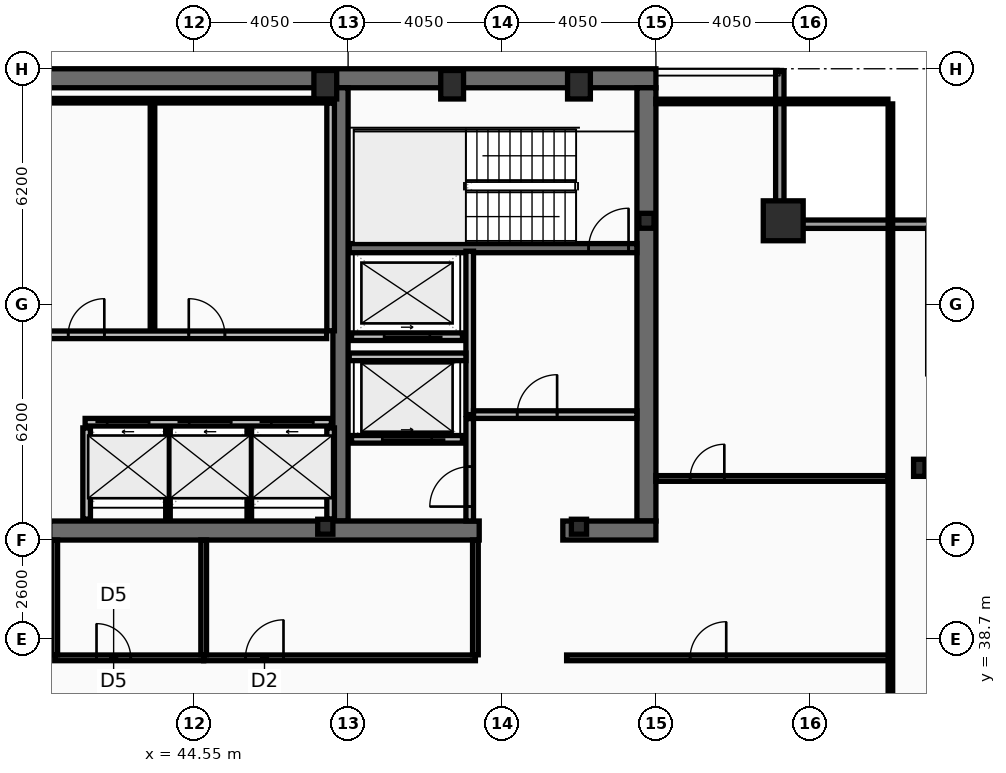
"""IFC4 building model, lengths in metres.
Left out: names, types, materials, properties, quantities, classifications, styles, units other than length and angle.
Written with IfcOpenShell. Run it as: python <this file> out.ifc"""

import sys

from ifc_helpers import new_model, si_unit, direction, frame, frame_2d, origin, origin_2d, place, context, subcontext, project, spatial, rectangle, hollow_rectangle, i_section, extrude, element, fill, save


model = new_model("IFC4")
c1 = context("Model", 3, precision=1e-05, world=origin(), true_north=direction((0.0, 1.0)))
c2 = subcontext(c1, "Body", "Model", "MODEL_VIEW")
j1 = project(units=[si_unit("LENGTHUNIT", "METRE"), si_unit("PLANEANGLEUNIT", "RADIAN")], contexts=[c1])
p1 = place(None, origin())
s1 = spatial("IfcSite", under=j1, at=p1, CompositionType="ELEMENT")
p2 = place(p1, origin())
s2 = spatial("IfcBuilding", under=s1, at=p2, CompositionType="ELEMENT")
p3 = place(p2, frame((0.0, 0.0, 273.4)))
s3 = spatial("IfcBuildingStorey", under=s2, at=p3, CompositionType="ELEMENT", Elevation=273.4)
p4 = place(p3, frame((16.2, 53.45, 0.0), z_axis=(0.0, 0.0, 1.0), x_axis=(1.0, 0.0, 0.0)))
e1 = element("IfcWall", 1, at=p4, inside=s3, PredefinedType="SHEAR", context=c2, shape_type="SweptSolid", body=[
    extrude(rectangle(XDim=40.5, YDim=0.5, at=frame_2d((20.25, 0.0))), origin(), (0.0, 0.0, 1.0), 3.44),
])
p5 = place(p3, frame((56.45, 53.2, 0.0), z_axis=(0.0, 0.0, 1.0), x_axis=(0.0, -1.0, 0.0)))
e2 = element("IfcWall", 2, at=p5, inside=s3, PredefinedType="SHEAR", context=c2, shape_type="SweptSolid", body=[
    extrude(rectangle(XDim=11.4, YDim=0.5, at=frame_2d((5.7, 0.0))), origin(), (0.0, 0.0, 1.0), 3.44),
])
p6 = place(p3, frame((48.4, 41.8, 0.0), z_axis=(0.0, 0.0, 1.0), x_axis=(0.0, 1.0, 0.0)))
e3 = element("IfcWall", 3, at=p6, inside=s3, PredefinedType="SHEAR", context=c2, shape_type="SweptSolid", body=[
    extrude(rectangle(XDim=11.4, YDim=0.4, at=frame_2d((5.7, 0.0))), origin(), (0.0, 0.0, 1.0), 3.44),
])
p7 = place(p3, frame((52.05, 41.55, 0.0), z_axis=(0.0, 0.0, 1.0), x_axis=(-1.0, 0.0, 0.0)))
e4 = element("IfcWall", 4, at=p7, inside=s3, PredefinedType="SHEAR", context=c2, shape_type="SweptSolid", body=[
    extrude(rectangle(XDim=11.3, YDim=0.5, at=frame_2d((5.65, 0.0))), origin(), (0.0, 0.0, 1.0), 3.44),
])
p8 = place(p3, frame((56.7, 41.55, 0.0), z_axis=(0.0, 0.0, 1.0), x_axis=(-1.0, 0.0, 0.0)))
e5 = element("IfcWall", 5, at=p8, inside=s3, PredefinedType="SHEAR", context=c2, shape_type="SweptSolid", body=[
    extrude(rectangle(XDim=2.45, YDim=0.5, at=frame_2d((1.225, 0.0))), origin(), (0.0, 0.0, 1.0), 3.44),
])
p9 = place(p3, frame((48.63, 48.98, 0.0), z_axis=(0.0, 0.0, 1.0), x_axis=(1.0, 0.0, 0.0)))
e6 = element("IfcWall", 6, at=p9, inside=s3, PredefinedType="SHEAR", context=c2, shape_type="SweptSolid", body=[
    extrude(rectangle(XDim=7.57, YDim=0.24, at=frame_2d((3.785, 0.0))), origin(), (0.0, 0.0, 1.0), 3.44),
])
p10 = place(p9, frame((6.3, 0.0, 0.0)))
e7 = element("IfcOpeningElement", 7, at=p10, cuts=e6, PredefinedType="OPENING", context=c2, shape_type="SweptSolid", body=[
    extrude(rectangle(XDim=1.05, YDim=2.15, at=frame_2d((0.525, 1.075))), frame((0.0, 0.13, 0.0), z_axis=(0.0, -1.0, 0.0), x_axis=(1.0, 0.0, 0.0)), (0.0, 0.0, 1.0), 0.26),
])
p11 = place(p3, frame((60.05, 49.7, 0.0), z_axis=(0.0, 0.0, 1.0), x_axis=(1.0, 0.0, 0.0)))
e8 = element("IfcColumn", 8, at=p11, inside=s3, PredefinedType="COLUMN", context=c2, shape_type="SweptSolid", body=[
    extrude(hollow_rectangle(XDim=1.05, YDim=1.05, WallThickness=0.055, at=origin_2d()), origin(), (0.0, 0.0, 1.0), 3.6),
])
for number, where, z_axis, x_axis in (
    (9, (48.0, 53.28, 0.0), (0.0, 0.0, 1.0), (1.0, 0.0, 0.0)),
    (10, (51.337, 53.28, 0.0), (0.0, 0.0, 1.0), (1.0, 0.0, 0.0)),
    (11, (54.675, 53.28, 0.0), (0.0, 0.0, 1.0), (1.0, 0.0, 0.0)),
):
    element("IfcColumn", number, at=place(p3, frame(where, z_axis=z_axis, x_axis=x_axis)), inside=s3, PredefinedType="COLUMN", context=c2, shape_type="SweptSolid", body=[
        extrude(hollow_rectangle(XDim=0.6, YDim=0.75, WallThickness=0.045, at=origin_2d()), origin(), (0.0, 0.0, 1.0), 3.6),
    ])
p12 = place(p3, frame((63.63, 43.2, 0.0), z_axis=(0.0, 0.0, 1.0), x_axis=(1.0, 0.0, 0.0)))
e12 = element("IfcColumn", 12, at=p12, inside=s3, PredefinedType="COLUMN", context=c2, shape_type="SweptSolid", body=[
    extrude(i_section(OverallWidth=0.3, OverallDepth=0.45, WebThickness=0.014, FlangeThickness=0.026, at=origin_2d()), origin(), (0.0, 0.0, 1.0), 3.6),
])
for number, where, z_axis, x_axis in (
    (13, (56.45, 49.7, 0.0), (0.0, 0.0, 1.0), (1.0, 0.0, 0.0)),
    (14, (48.0, 41.65, 0.0), (0.0, 0.0, 1.0), (1.0, 0.0, 0.0)),
    (15, (54.675, 41.65, 0.0), (0.0, 0.0, 1.0), (1.0, 0.0, 0.0)),
):
    element("IfcColumn", number, at=place(p3, frame(where, z_axis=z_axis, x_axis=x_axis)), inside=s3, PredefinedType="COLUMN", context=c2, shape_type="SweptSolid", body=[
        extrude(i_section(OverallWidth=0.399, OverallDepth=0.393, WebThickness=0.023, FlangeThickness=0.037, at=origin_2d()), origin(), (0.0, 0.0, 1.0), 3.6),
    ])
p13 = place(p3, frame((59.96, 53.63, 0.0), z_axis=(0.0, 0.0, 1.0), x_axis=(0.0, -1.0, 0.0)))
e16 = element("IfcWall", 16, at=p13, inside=s3, PredefinedType="SOLIDWALL", context=c2, shape_type="SweptSolid", body=[
    extrude(rectangle(XDim=3.91, YDim=0.22, at=frame_2d((1.955, 0.0))), origin(), (0.0, 0.0, 1.0), 2.88),
])
p14 = place(p3, frame((59.85, 49.61, 0.0), z_axis=(0.0, 0.0, 1.0), x_axis=(1.0, 0.0, 0.0)))
e17 = element("IfcWall", 17, at=p14, inside=s3, PredefinedType="SOLIDWALL", context=c2, shape_type="SweptSolid", body=[
    extrude(rectangle(XDim=4.22, YDim=0.22, at=frame_2d((2.11, 0.0))), origin(), (0.0, 0.0, 1.0), 2.88),
])
p15 = place(p3, frame((41.68, 44.4, 0.0), z_axis=(0.0, 0.0, 1.0), x_axis=(1.0, 0.0, 0.0)))
e18 = element("IfcWall", 18, at=p15, inside=s3, PredefinedType="PARTITIONING", context=c2, shape_type="SweptSolid", body=[
    extrude(rectangle(XDim=6.48, YDim=0.2, at=frame_2d((3.24, 0.0))), origin(), (0.0, 0.0, 1.0), 3.44),
])
p16 = place(p15, frame((0.58, 0.0, 0.0)))
e19 = element("IfcOpeningElement", 19, at=p16, cuts=e18, PredefinedType="OPENING", context=c2, shape_type="SweptSolid", body=[
    extrude(rectangle(XDim=1.1, YDim=2.18, at=frame_2d((0.55, 1.09))), frame((0.0, 0.11, 0.0), z_axis=(0.0, -1.0, 0.0), x_axis=(1.0, 0.0, 0.0)), (0.0, 0.0, 1.0), 0.22),
])
p17 = place(p15, frame((2.74, 0.0, 0.0)))
e20 = element("IfcOpeningElement", 20, at=p17, cuts=e18, PredefinedType="OPENING", context=c2, shape_type="SweptSolid", body=[
    extrude(rectangle(XDim=1.1, YDim=2.18, at=frame_2d((0.55, 1.09))), frame((0.0, 0.11, 0.0), z_axis=(0.0, -1.0, 0.0), x_axis=(1.0, 0.0, 0.0)), (0.0, 0.0, 1.0), 0.22),
])
p18 = place(p15, frame((4.9, 0.0, 0.0)))
e21 = element("IfcOpeningElement", 21, at=p18, cuts=e18, PredefinedType="OPENING", context=c2, shape_type="SweptSolid", body=[
    extrude(rectangle(XDim=1.1, YDim=2.18, at=frame_2d((0.55, 1.09))), frame((0.0, 0.11, 0.0), z_axis=(0.0, -1.0, 0.0), x_axis=(1.0, 0.0, 0.0)), (0.0, 0.0, 1.0), 0.22),
])
p19 = place(p3, frame((51.61, 43.95, 0.0), z_axis=(0.0, 0.0, 1.0), x_axis=(-1.0, 0.0, 0.0)))
e22 = element("IfcWall", 22, at=p19, inside=s3, PredefinedType="PARTITIONING", context=c2, shape_type="SweptSolid", body=[
    extrude(rectangle(XDim=2.92, YDim=0.2, at=frame_2d((1.46, 0.0))), origin(), (0.0, 0.0, 1.0), 3.44),
])
p20 = place(p19, frame((0.81, 0.0, 0.0)))
e23 = element("IfcOpeningElement", 23, at=p20, cuts=e22, PredefinedType="OPENING", context=c2, shape_type="SweptSolid", body=[
    extrude(rectangle(XDim=1.3, YDim=2.18, at=frame_2d((0.65, 1.09))), frame((0.0, 0.11, 0.0), z_axis=(0.0, -1.0, 0.0), x_axis=(1.0, 0.0, 0.0)), (0.0, 0.0, 1.0), 0.22),
])
p21 = place(p3, frame((51.61, 46.65, 0.0), z_axis=(0.0, 0.0, 1.0), x_axis=(-1.0, 0.0, 0.0)))
e24 = element("IfcWall", 24, at=p21, inside=s3, PredefinedType="PARTITIONING", context=c2, shape_type="SweptSolid", body=[
    extrude(rectangle(XDim=2.92, YDim=0.2, at=frame_2d((1.46, 0.0))), origin(), (0.0, 0.0, 1.0), 3.44),
])
p22 = place(p21, frame((0.86, 0.0, 0.0)))
e25 = element("IfcOpeningElement", 25, at=p22, cuts=e24, PredefinedType="OPENING", context=c2, shape_type="SweptSolid", body=[
    extrude(rectangle(XDim=1.2, YDim=2.18, at=frame_2d((0.6, 1.09))), frame((0.0, 0.11, 0.0), z_axis=(0.0, -1.0, 0.0), x_axis=(1.0, 0.0, 0.0)), (0.0, 0.0, 1.0), 0.22),
])
p23 = place(p3, frame((51.8, 44.6, 0.0), z_axis=(0.0, 0.0, 1.0), x_axis=(0.0, 1.0, 0.0)))
e26 = element("IfcWall", 26, at=p23, inside=s3, PredefinedType="PARTITIONING", context=c2, shape_type="SweptSolid", body=[
    extrude(rectangle(XDim=4.3, YDim=0.2, at=frame_2d((2.15, 0.0))), origin(), (0.0, 0.0, 1.0), 3.44),
])
p24 = place(p3, frame((51.9, 44.6, 0.0), z_axis=(0.0, 0.0, 1.0), x_axis=(1.0, 0.0, 0.0)))
e27 = element("IfcWall", 27, at=p24, inside=s3, PredefinedType="PARTITIONING", context=c2, shape_type="SweptSolid", body=[
    extrude(rectangle(XDim=4.3, YDim=0.2, at=frame_2d((2.15, 0.0))), origin(), (0.0, 0.0, 1.0), 3.44),
])
p25 = place(p24, frame((1.15, 0.0, 0.0)))
e28 = element("IfcOpeningElement", 28, at=p25, cuts=e27, PredefinedType="OPENING", context=c2, shape_type="SweptSolid", body=[
    extrude(rectangle(XDim=1.05, YDim=2.15, at=frame_2d((0.525, 1.075))), frame((0.0, 0.11, 0.0), z_axis=(0.0, -1.0, 0.0), x_axis=(1.0, 0.0, 0.0)), (0.0, 0.0, 1.0), 0.22),
])
p26 = place(p3, frame((48.63, 46.12, 0.0), z_axis=(0.0, 0.0, 1.0), x_axis=(1.0, 0.0, 0.0)))
e29 = element("IfcWall", 29, at=p26, inside=s3, PredefinedType="PARTITIONING", context=c2, shape_type="SweptSolid", body=[
    extrude(rectangle(XDim=3.07, YDim=0.2, at=frame_2d((1.535, 0.0))), origin(), (0.0, 0.0, 1.0), 3.44),
])
p27 = place(p3, frame((51.8, 41.8, 0.0), z_axis=(0.0, 0.0, 1.0), x_axis=(0.0, 1.0, 0.0)))
e30 = element("IfcWall", 30, at=p27, inside=s3, PredefinedType="PARTITIONING", context=c2, shape_type="SweptSolid", body=[
    extrude(rectangle(XDim=2.695, YDim=0.2, at=frame_2d((1.348, 0.0))), origin(), (0.0, 0.0, 1.0), 3.44),
])
p28 = place(p27, frame((0.38, 0.0, 0.0)))
e31 = element("IfcOpeningElement", 31, at=p28, cuts=e30, PredefinedType="OPENING", context=c2, shape_type="SweptSolid", body=[
    extrude(rectangle(XDim=1.05, YDim=2.15, at=frame_2d((0.525, 1.075))), frame((0.0, 0.11, 0.0), z_axis=(0.0, -1.0, 0.0), x_axis=(1.0, 0.0, 0.0)), (0.0, 0.0, 1.0), 0.22),
])
p29 = place(p3, frame((48.14, 46.805, 0.0), z_axis=(0.0, 0.0, 1.0), x_axis=(0.0, 1.0, 0.0)))
e32 = element("IfcWall", 32, at=p29, inside=s3, PredefinedType="PARTITIONING", context=c2, shape_type="SweptSolid", body=[
    extrude(rectangle(XDim=5.99, YDim=0.2, at=frame_2d((2.995, 0.0))), origin(), (0.0, 0.0, 1.0), 3.44),
])
p30 = place(p3, frame((40.685, 52.86, 0.0), z_axis=(0.0, 0.0, 1.0), x_axis=(1.0, 0.0, 0.0)))
e33 = element("IfcWall", 33, at=p30, inside=s3, PredefinedType="PARTITIONING", context=c2, shape_type="SweptSolid", body=[
    extrude(rectangle(XDim=7.35, YDim=0.12, at=frame_2d((3.675, 0.0))), origin(), (0.0, 0.0, 1.0), 3.44),
])
p31 = place(p3, frame((43.453, 46.805, 0.0), z_axis=(0.0, 0.0, 1.0), x_axis=(0.0, 1.0, 0.0)))
e34 = element("IfcWall", 34, at=p31, inside=s3, PredefinedType="PARTITIONING", context=c2, shape_type="SweptSolid", body=[
    extrude(rectangle(XDim=5.99, YDim=0.12, at=frame_2d((2.995, 0.0))), origin(), (0.0, 0.0, 1.0), 3.44),
])
p32 = place(p3, frame((40.685, 46.7, 0.0), z_axis=(0.0, 0.0, 1.0), x_axis=(1.0, 0.0, 0.0)))
e35 = element("IfcWall", 35, at=p32, inside=s3, PredefinedType="PARTITIONING", context=c2, shape_type="SweptSolid", body=[
    extrude(rectangle(XDim=7.35, YDim=0.2, at=frame_2d((3.675, 0.0))), origin(), (0.0, 0.0, 1.0), 3.44),
])
p33 = place(p32, frame((0.55, 0.0, 0.0)))
e36 = element("IfcOpeningElement", 36, at=p33, cuts=e35, PredefinedType="OPENING", context=c2, shape_type="SweptSolid", body=[
    extrude(rectangle(XDim=0.95, YDim=2.1, at=frame_2d((0.475, 1.05))), frame((0.0, 0.11, 0.0), z_axis=(0.0, -1.0, 0.0), x_axis=(1.0, 0.0, 0.0)), (0.0, 0.0, 1.0), 0.22),
])
p34 = place(p32, frame((3.723, 0.0, 0.0)))
e37 = element("IfcOpeningElement", 37, at=p34, cuts=e35, PredefinedType="OPENING", context=c2, shape_type="SweptSolid", body=[
    extrude(rectangle(XDim=0.95, YDim=2.1, at=frame_2d((0.475, 1.05))), frame((0.0, 0.11, 0.0), z_axis=(0.0, -1.0, 0.0), x_axis=(1.0, 0.0, 0.0)), (0.0, 0.0, 1.0), 0.22),
])
for number, where, z_axis, x_axis in (
    (38, (41.72, 41.85, 0.0), (0.0, 0.0, 1.0), (0.0, 1.0, 0.0)),
    (39, (48.14, 41.85, 0.0), (0.0, 0.0, 1.0), (0.0, 1.0, 0.0)),
):
    element("IfcWall", number, at=place(p3, frame(where, z_axis=z_axis, x_axis=x_axis)), inside=s3, PredefinedType="PARTITIONING", context=c2, shape_type="SweptSolid", body=[
        extrude(rectangle(XDim=2.4, YDim=0.2, at=frame_2d((1.2, 0.0))), origin(), (0.0, 0.0, 1.0), 3.44),
    ])
for number, where, z_axis, x_axis in (
    (40, (43.86, 41.85, 0.0), (0.0, 0.0, 1.0), (0.0, 1.0, 0.0)),
    (41, (46.0, 41.85, 0.0), (0.0, 0.0, 1.0), (0.0, 1.0, 0.0)),
):
    element("IfcWall", number, at=place(p3, frame(where, z_axis=z_axis, x_axis=x_axis)), inside=s3, PredefinedType="PARTITIONING", context=c2, shape_type="SweptSolid", body=[
        extrude(rectangle(XDim=2.4, YDim=0.12, at=frame_2d((1.2, 0.0))), origin(), (0.0, 0.0, 1.0), 3.44),
    ])
p35 = place(p3, frame((40.88, 38.2, 0.0), z_axis=(0.0, 0.0, 1.0), x_axis=(1.0, 0.0, 0.0)))
e42 = element("IfcWall", 42, at=p35, inside=s3, PredefinedType="PARTITIONING", context=c2, shape_type="SweptSolid", body=[
    extrude(rectangle(XDim=3.92, YDim=0.15, at=frame_2d((1.96, 0.0))), origin(), (0.0, 0.0, 1.0), 2.78),
])
p36 = place(p35, frame((1.1, 0.0, 0.0)))
e43 = element("IfcOpeningElement", 43, at=p36, cuts=e42, PredefinedType="OPENING", context=c2, shape_type="SweptSolid", body=[
    extrude(rectangle(XDim=0.9, YDim=2.05, at=frame_2d((0.45, 1.025))), frame((0.0, 0.085, 0.0), z_axis=(0.0, -1.0, 0.0), x_axis=(1.0, 0.0, 0.0)), (0.0, 0.0, 1.0), 0.17),
])
p37 = place(p3, frame((44.8, 38.2, 0.0), z_axis=(0.0, 0.0, 1.0), x_axis=(1.0, 0.0, 0.0)))
e44 = element("IfcWall", 44, at=p37, inside=s3, PredefinedType="PARTITIONING", context=c2, shape_type="SweptSolid", body=[
    extrude(rectangle(XDim=7.15, YDim=0.15, at=frame_2d((3.575, 0.0))), origin(), (0.0, 0.0, 1.0), 2.78),
])
p38 = place(p37, frame((1.1, 0.0, 0.0)))
e45 = element("IfcOpeningElement", 45, at=p38, cuts=e44, PredefinedType="OPENING", context=c2, shape_type="SweptSolid", body=[
    extrude(rectangle(XDim=1.0, YDim=2.05, at=frame_2d((0.5, 1.025))), frame((0.0, 0.085, 0.0), z_axis=(0.0, -1.0, 0.0), x_axis=(1.0, 0.0, 0.0)), (0.0, 0.0, 1.0), 0.17),
])
for number, where, z_axis, x_axis in (
    (46, (40.88, 38.28, 0.0), (0.0, 0.0, 1.0), (0.0, 1.0, 0.0)),
    (47, (44.8, 38.28, 0.0), (0.0, 0.0, 1.0), (0.0, 1.0, 0.0)),
    (48, (51.95, 38.28, 0.0), (0.0, 0.0, 1.0), (0.0, 1.0, 0.0)),
):
    element("IfcWall", number, at=place(p3, frame(where, z_axis=z_axis, x_axis=x_axis)), inside=s3, PredefinedType="PARTITIONING", context=c2, shape_type="SweptSolid", body=[
        extrude(rectangle(XDim=3.02, YDim=0.15, at=frame_2d((1.51, 0.0))), origin(), (0.0, 0.0, 1.0), 3.44),
    ])
p39 = place(p3, frame((54.35, 38.2, 0.0), z_axis=(0.0, 0.0, 1.0), x_axis=(1.0, 0.0, 0.0)))
e49 = element("IfcWall", 49, at=p39, inside=s3, PredefinedType="PARTITIONING", context=c2, shape_type="SweptSolid", body=[
    extrude(rectangle(XDim=8.52, YDim=0.15, at=frame_2d((4.26, 0.0))), origin(), (0.0, 0.0, 1.0), 2.78),
])
p40 = place(p39, frame((3.25, 0.0, 0.0)))
e50 = element("IfcOpeningElement", 50, at=p40, cuts=e49, PredefinedType="OPENING", context=c2, shape_type="SweptSolid", body=[
    extrude(rectangle(XDim=0.95, YDim=2.05, at=frame_2d((0.475, 1.025))), frame((0.0, 0.085, 0.0), z_axis=(0.0, -1.0, 0.0), x_axis=(1.0, 0.0, 0.0)), (0.0, 0.0, 1.0), 0.17),
])
p41 = place(p3, frame((56.7, 42.92, 0.0), z_axis=(0.0, 0.0, 1.0), x_axis=(1.0, 0.0, 0.0)))
e51 = element("IfcWall", 51, at=p41, inside=s3, PredefinedType="PARTITIONING", context=c2, shape_type="SweptSolid", body=[
    extrude(rectangle(XDim=6.105, YDim=0.15, at=frame_2d((3.052, 0.0))), origin(), (0.0, 0.0, 1.0), 2.78),
])
p42 = place(p41, frame((0.9, 0.0, 0.0)))
e52 = element("IfcOpeningElement", 52, at=p42, cuts=e51, PredefinedType="OPENING", context=c2, shape_type="SweptSolid", body=[
    extrude(rectangle(XDim=0.9, YDim=2.05, at=frame_2d((0.45, 1.025))), frame((0.0, 0.085, 0.0), z_axis=(0.0, -1.0, 0.0), x_axis=(1.0, 0.0, 0.0)), (0.0, 0.0, 1.0), 0.17),
])
p43 = place(p3, frame((62.87, 10.665, 0.0), z_axis=(0.0, 0.0, 1.0), x_axis=(0.0, 1.0, 0.0)))
e53 = element("IfcWall", 53, at=p43, inside=s3, PredefinedType="PARTITIONING", context=c2, shape_type="SweptSolid", body=[
    extrude(rectangle(XDim=42.11, YDim=0.12, at=frame_2d((21.055, 0.0))), origin(), (0.0, 0.0, 1.0), 2.78),
])
p44 = place(p3, frame((56.7, 52.84, 0.0), z_axis=(0.0, 0.0, 1.0), x_axis=(1.0, 0.0, 0.0)))
e54 = element("IfcWall", 54, at=p44, inside=s3, PredefinedType="PARTITIONING", context=c2, shape_type="SweptSolid", body=[
    extrude(rectangle(XDim=6.105, YDim=0.12, at=frame_2d((3.052, 0.0))), origin(), (0.0, 0.0, 1.0), 3.44),
])
p45 = place(p10, origin())
e55 = element("IfcDoor", 55, at=p45, inside=s3, OperationType="SINGLE_SWING_RIGHT", PredefinedType="DOOR", context=c2, shape_type="SweptSolid", body=[
    extrude(rectangle(XDim=1.05, YDim=2.15, at=frame_2d((0.525, 1.075))), frame((0.0, 0.025, 0.0), z_axis=(0.0, -1.0, 0.0), x_axis=(1.0, 0.0, 0.0)), (0.0, 0.0, 1.0), 0.05),
])
fill(e7, e55)
p46 = place(p16, origin())
e56 = element("IfcDoor", 56, at=p46, inside=s3, OperationType="SLIDING_TO_LEFT", PredefinedType="DOOR", context=c2, shape_type="SweptSolid", body=[
    extrude(rectangle(XDim=1.1, YDim=2.18, at=frame_2d((0.55, 1.09))), frame((0.0, 0.025, 0.0), z_axis=(0.0, -1.0, 0.0), x_axis=(1.0, 0.0, 0.0)), (0.0, 0.0, 1.0), 0.05),
])
fill(e19, e56)
p47 = place(p17, origin())
e57 = element("IfcDoor", 57, at=p47, inside=s3, OperationType="SLIDING_TO_LEFT", PredefinedType="DOOR", context=c2, shape_type="SweptSolid", body=[
    extrude(rectangle(XDim=1.1, YDim=2.18, at=frame_2d((0.55, 1.09))), frame((0.0, 0.025, 0.0), z_axis=(0.0, -1.0, 0.0), x_axis=(1.0, 0.0, 0.0)), (0.0, 0.0, 1.0), 0.05),
])
fill(e20, e57)
p48 = place(p18, origin())
e58 = element("IfcDoor", 58, at=p48, inside=s3, OperationType="SLIDING_TO_LEFT", PredefinedType="DOOR", context=c2, shape_type="SweptSolid", body=[
    extrude(rectangle(XDim=1.1, YDim=2.18, at=frame_2d((0.55, 1.09))), frame((0.0, 0.025, 0.0), z_axis=(0.0, -1.0, 0.0), x_axis=(1.0, 0.0, 0.0)), (0.0, 0.0, 1.0), 0.05),
])
fill(e21, e58)
p49 = place(p20, origin())
e59 = element("IfcDoor", 59, at=p49, inside=s3, OperationType="SLIDING_TO_LEFT", PredefinedType="DOOR", context=c2, shape_type="SweptSolid", body=[
    extrude(rectangle(XDim=1.3, YDim=2.18, at=frame_2d((0.65, 1.09))), frame((0.0, 0.025, 0.0), z_axis=(0.0, -1.0, 0.0), x_axis=(1.0, 0.0, 0.0)), (0.0, 0.0, 1.0), 0.05),
])
fill(e23, e59)
p50 = place(p22, origin())
e60 = element("IfcDoor", 60, at=p50, inside=s3, OperationType="SLIDING_TO_LEFT", PredefinedType="DOOR", context=c2, shape_type="SweptSolid", body=[
    extrude(rectangle(XDim=1.2, YDim=2.18, at=frame_2d((0.6, 1.09))), frame((0.0, 0.025, 0.0), z_axis=(0.0, -1.0, 0.0), x_axis=(1.0, 0.0, 0.0)), (0.0, 0.0, 1.0), 0.05),
])
fill(e25, e60)
p51 = place(p25, origin())
e61 = element("IfcDoor", 61, at=p51, inside=s3, OperationType="SINGLE_SWING_RIGHT", PredefinedType="DOOR", context=c2, shape_type="SweptSolid", body=[
    extrude(rectangle(XDim=1.05, YDim=2.15, at=frame_2d((0.525, 1.075))), frame((0.0, 0.025, 0.0), z_axis=(0.0, -1.0, 0.0), x_axis=(1.0, 0.0, 0.0)), (0.0, 0.0, 1.0), 0.05),
])
fill(e28, e61)
p52 = place(p28, origin())
e62 = element("IfcDoor", 62, at=p52, inside=s3, OperationType="SINGLE_SWING_LEFT", PredefinedType="DOOR", context=c2, shape_type="SweptSolid", body=[
    extrude(rectangle(XDim=1.05, YDim=2.15, at=frame_2d((0.525, 1.075))), frame((0.0, 0.025, 0.0), z_axis=(0.0, -1.0, 0.0), x_axis=(1.0, 0.0, 0.0)), (0.0, 0.0, 1.0), 0.05),
])
fill(e31, e62)
p53 = place(p33, origin())
e63 = element("IfcDoor", 63, at=p53, inside=s3, OperationType="SINGLE_SWING_RIGHT", PredefinedType="DOOR", context=c2, shape_type="SweptSolid", body=[
    extrude(rectangle(XDim=0.95, YDim=2.1, at=frame_2d((0.475, 1.05))), frame((0.0, 0.025, 0.0), z_axis=(0.0, -1.0, 0.0), x_axis=(1.0, 0.0, 0.0)), (0.0, 0.0, 1.0), 0.05),
])
fill(e36, e63)
p54 = place(p34, origin())
e64 = element("IfcDoor", 64, at=p54, inside=s3, OperationType="SINGLE_SWING_LEFT", PredefinedType="DOOR", context=c2, shape_type="SweptSolid", body=[
    extrude(rectangle(XDim=0.95, YDim=2.1, at=frame_2d((0.475, 1.05))), frame((0.0, 0.025, 0.0), z_axis=(0.0, -1.0, 0.0), x_axis=(1.0, 0.0, 0.0)), (0.0, 0.0, 1.0), 0.05),
])
fill(e37, e64)
p55 = place(p36, origin())
e65 = element("IfcDoor", 65, at=p55, inside=s3, OperationType="SINGLE_SWING_LEFT", PredefinedType="DOOR", context=c2, shape_type="SweptSolid", body=[
    extrude(rectangle(XDim=0.9, YDim=2.05, at=frame_2d((0.45, 1.025))), frame((0.0, 0.025, 0.0), z_axis=(0.0, -1.0, 0.0), x_axis=(1.0, 0.0, 0.0)), (0.0, 0.0, 1.0), 0.05),
])
fill(e43, e65)
p56 = place(p38, origin())
e66 = element("IfcDoor", 66, at=p56, inside=s3, OperationType="SINGLE_SWING_RIGHT", PredefinedType="DOOR", context=c2, shape_type="SweptSolid", body=[
    extrude(rectangle(XDim=1.0, YDim=2.05, at=frame_2d((0.5, 1.025))), frame((0.0, 0.025, 0.0), z_axis=(0.0, -1.0, 0.0), x_axis=(1.0, 0.0, 0.0)), (0.0, 0.0, 1.0), 0.05),
])
fill(e45, e66)
p57 = place(p40, origin())
e67 = element("IfcDoor", 67, at=p57, inside=s3, OperationType="SINGLE_SWING_RIGHT", PredefinedType="DOOR", context=c2, shape_type="SweptSolid", body=[
    extrude(rectangle(XDim=0.95, YDim=2.05, at=frame_2d((0.475, 1.025))), frame((0.0, 0.025, 0.0), z_axis=(0.0, -1.0, 0.0), x_axis=(1.0, 0.0, 0.0)), (0.0, 0.0, 1.0), 0.05),
])
fill(e50, e67)
p58 = place(p42, origin())
e68 = element("IfcDoor", 68, at=p58, inside=s3, OperationType="SINGLE_SWING_RIGHT", PredefinedType="DOOR", context=c2, shape_type="SweptSolid", body=[
    extrude(rectangle(XDim=0.9, YDim=2.05, at=frame_2d((0.45, 1.025))), frame((0.0, 0.025, 0.0), z_axis=(0.0, -1.0, 0.0), x_axis=(1.0, 0.0, 0.0)), (0.0, 0.0, 1.0), 0.05),
])
fill(e52, e68)
save(model, sys.argv[1])
